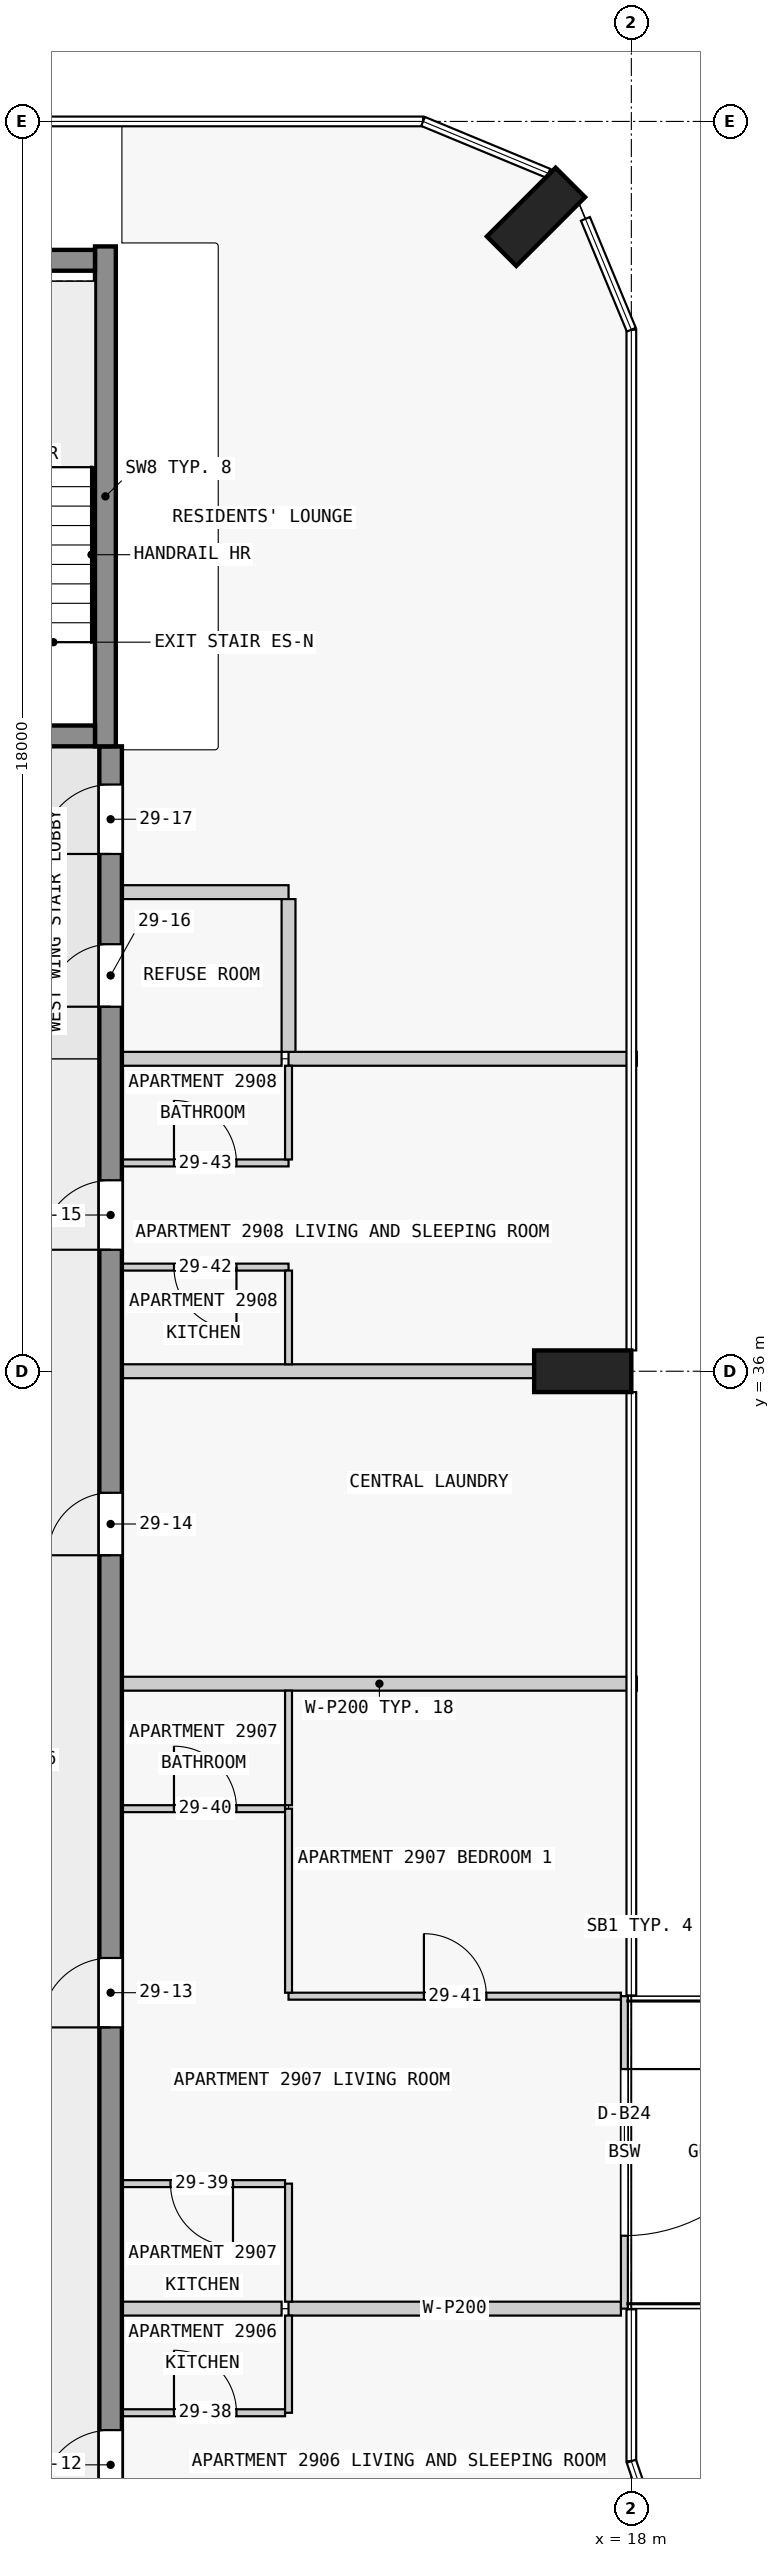
"""IFC4 building model, lengths in metres.
Left out: names, types, materials, properties, quantities, classifications, styles, units other than length and angle.
Written with IfcOpenShell. Run it as: python <this file> out.ifc"""

import sys

from ifc_helpers import new_model, si_unit, direction, frame, frame_2d, origin, origin_2d, place, context, subcontext, project, spatial, rectangle, extrude, element, fill, save


model = new_model("IFC4")
c1 = context("Model", 3, precision=1e-05, world=origin(), true_north=direction((0.0, 1.0)))
c2 = subcontext(c1, "Body", "Model", "MODEL_VIEW")
j1 = project(units=[si_unit("LENGTHUNIT", "METRE"), si_unit("PLANEANGLEUNIT", "RADIAN")], contexts=[c1])
p1 = place(None, origin())
s1 = spatial("IfcSite", under=j1, at=p1, CompositionType="ELEMENT")
p2 = place(p1, origin())
s2 = spatial("IfcBuilding", under=s1, at=p2, CompositionType="ELEMENT")
p3 = place(p2, frame((0.0, 0.0, 113.3)))
s3 = spatial("IfcBuildingStorey", under=s2, at=p3, CompositionType="ELEMENT", Elevation=113.3)
for number, where, z_axis, x_axis in (
    (1, (17.3, 36.0, 0.0), (0.0, 0.0, 1.0), (0.0, 1.0, 0.0)),
    (2, (16.626, 52.626, 0.0), (0.0, 0.0, 1.0), (-0.707, 0.707, 0.0)),
):
    element("IfcColumn", number, at=place(p3, frame(where, z_axis=z_axis, x_axis=x_axis)), inside=s3, PredefinedType="COLUMN", context=c2, shape_type="SweptSolid", body=[
        extrude(rectangle(XDim=0.6, YDim=1.4, at=origin_2d()), origin(), (0.0, 0.0, 1.0), 3.5),
    ])
p4 = place(p3, frame((7.725, 45.15, 0.0), z_axis=(0.0, 0.0, 1.0), x_axis=(1.0, 0.0, 0.0)))
e3 = element("IfcWall", 3, at=p4, inside=s3, PredefinedType="SHEAR", context=c2, shape_type="SweptSolid", body=[
    extrude(rectangle(XDim=2.55, YDim=0.3, at=frame_2d((1.275, 0.0))), origin(), (0.0, 0.0, 1.0), 3.5),
])
p5 = place(p4, frame((0.725, 0.0, 0.0)))
e4 = element("IfcOpeningElement", 4, at=p5, cuts=e3, PredefinedType="OPENING", context=c2, shape_type="SweptSolid", body=[
    extrude(rectangle(XDim=1.1, YDim=2.1, at=frame_2d((0.55, 1.05))), frame((0.0, 0.16, 0.0), z_axis=(0.0, -1.0, 0.0), x_axis=(1.0, 0.0, 0.0)), (0.0, 0.0, 1.0), 0.32),
])
p6 = place(p3, frame((7.725, 52.0, 0.0), z_axis=(0.0, 0.0, 1.0), x_axis=(1.0, 0.0, 0.0)))
e5 = element("IfcWall", 5, at=p6, inside=s3, PredefinedType="SHEAR", context=c2, shape_type="SweptSolid", body=[
    extrude(rectangle(XDim=2.55, YDim=0.3, at=frame_2d((1.275, 0.0))), origin(), (0.0, 0.0, 1.0), 3.5),
])
p7 = place(p3, frame((10.425, 45.0, 0.0), z_axis=(0.0, 0.0, 1.0), x_axis=(0.0, 1.0, 0.0)))
e6 = element("IfcWall", 6, at=p7, inside=s3, PredefinedType="SHEAR", context=c2, shape_type="SweptSolid", body=[
    extrude(rectangle(XDim=7.2, YDim=0.3, at=frame_2d((3.6, 0.0))), origin(), (0.0, 0.0, 1.0), 3.5),
])
p8 = place(p3, frame((10.5, 18.0, 0.0), z_axis=(0.0, 0.0, 1.0), x_axis=(0.0, 1.0, 0.0)))
e7 = element("IfcWall", 7, at=p8, inside=s3, PredefinedType="SHEAR", context=c2, shape_type="SweptSolid", body=[
    extrude(rectangle(XDim=27.0, YDim=0.325, at=frame_2d((13.5, 0.0))), origin(), (0.0, 0.0, 1.0), 3.25),
])
p9 = place(p8, frame((1.75, 0.0, 0.0)))
e8 = element("IfcOpeningElement", 8, at=p9, cuts=e7, PredefinedType="OPENING", context=c2, shape_type="SweptSolid", body=[
    extrude(rectangle(XDim=1.0, YDim=2.1, at=frame_2d((0.5, 1.05))), frame((0.0, 0.172, 0.0), z_axis=(0.0, -1.0, 0.0), x_axis=(1.0, 0.0, 0.0)), (0.0, 0.0, 1.0), 0.345),
])
p10 = place(p8, frame((8.55, 0.0, 0.0)))
e9 = element("IfcOpeningElement", 9, at=p10, cuts=e7, PredefinedType="OPENING", context=c2, shape_type="SweptSolid", body=[
    extrude(rectangle(XDim=1.0, YDim=2.1, at=frame_2d((0.5, 1.05))), frame((0.0, 0.172, 0.0), z_axis=(0.0, -1.0, 0.0), x_axis=(1.0, 0.0, 0.0)), (0.0, 0.0, 1.0), 0.345),
])
p11 = place(p8, frame((15.35, 0.0, 0.0)))
e10 = element("IfcOpeningElement", 10, at=p11, cuts=e7, PredefinedType="OPENING", context=c2, shape_type="SweptSolid", body=[
    extrude(rectangle(XDim=0.9, YDim=2.1, at=frame_2d((0.45, 1.05))), frame((0.0, 0.172, 0.0), z_axis=(0.0, -1.0, 0.0), x_axis=(1.0, 0.0, 0.0)), (0.0, 0.0, 1.0), 0.345),
])
p12 = place(p8, frame((19.75, 0.0, 0.0)))
e11 = element("IfcOpeningElement", 11, at=p12, cuts=e7, PredefinedType="OPENING", context=c2, shape_type="SweptSolid", body=[
    extrude(rectangle(XDim=1.0, YDim=2.1, at=frame_2d((0.5, 1.05))), frame((0.0, 0.172, 0.0), z_axis=(0.0, -1.0, 0.0), x_axis=(1.0, 0.0, 0.0)), (0.0, 0.0, 1.0), 0.345),
])
p13 = place(p8, frame((23.25, 0.0, 0.0)))
e12 = element("IfcOpeningElement", 12, at=p13, cuts=e7, PredefinedType="OPENING", context=c2, shape_type="SweptSolid", body=[
    extrude(rectangle(XDim=0.9, YDim=2.1, at=frame_2d((0.45, 1.05))), frame((0.0, 0.172, 0.0), z_axis=(0.0, -1.0, 0.0), x_axis=(1.0, 0.0, 0.0)), (0.0, 0.0, 1.0), 0.345),
])
p14 = place(p8, frame((25.45, 0.0, 0.0)))
e13 = element("IfcOpeningElement", 13, at=p14, cuts=e7, PredefinedType="OPENING", context=c2, shape_type="SweptSolid", body=[
    extrude(rectangle(XDim=1.0, YDim=2.1, at=frame_2d((0.5, 1.05))), frame((0.0, 0.172, 0.0), z_axis=(0.0, -1.0, 0.0), x_axis=(1.0, 0.0, 0.0)), (0.0, 0.0, 1.0), 0.345),
])
p15 = place(p3, frame((17.9, 27.0, 0.0), z_axis=(0.0, 0.0, 1.0), x_axis=(0.0, -1.0, 0.0)))
e14 = element("IfcWall", 14, at=p15, inside=s3, PredefinedType="STANDARD", context=c2, shape_type="SweptSolid", body=[
    extrude(rectangle(XDim=4.5, YDim=0.1, at=frame_2d((2.25, 0.0))), origin(), (0.0, 0.0, 1.0), 3.25),
])
p16 = place(p15, frame((1.05, 0.0, 0.0)))
e15 = element("IfcOpeningElement", 15, at=p16, cuts=e14, PredefinedType="OPENING", context=c2, shape_type="SweptSolid", body=[
    extrude(rectangle(XDim=2.4, YDim=2.4, at=frame_2d((1.2, 1.2))), frame((0.0, 0.06, 0.0), z_axis=(0.0, -1.0, 0.0), x_axis=(1.0, 0.0, 0.0)), (0.0, 0.0, 1.0), 0.12),
])
p17 = place(p3, frame((10.663, 21.0, 0.0), z_axis=(0.0, 0.0, 1.0), x_axis=(1.0, 0.0, 0.0)))
e16 = element("IfcWall", 16, at=p17, inside=s3, PredefinedType="PARTITIONING", context=c2, shape_type="SweptSolid", body=[
    extrude(rectangle(XDim=2.35, YDim=0.1, at=frame_2d((1.175, 0.0))), origin(), (0.0, 0.0, 1.0), 3.25),
])
p18 = place(p17, frame((0.75, 0.0, 0.0)))
e17 = element("IfcOpeningElement", 17, at=p18, cuts=e16, PredefinedType="OPENING", context=c2, shape_type="SweptSolid", body=[
    extrude(rectangle(XDim=0.9, YDim=2.1, at=frame_2d((0.45, 1.05))), frame((0.0, 0.06, 0.0), z_axis=(0.0, -1.0, 0.0), x_axis=(1.0, 0.0, 0.0)), (0.0, 0.0, 1.0), 0.12),
])
p19 = place(p3, frame((12.962, 22.5, 0.0), z_axis=(0.0, 0.0, 1.0), x_axis=(-1.0, 0.0, 0.0)))
e18 = element("IfcWall", 18, at=p19, inside=s3, PredefinedType="PARTITIONING", context=c2, shape_type="SweptSolid", body=[
    extrude(rectangle(XDim=2.3, YDim=0.2, at=frame_2d((1.15, 0.0))), origin(), (0.0, 0.0, 1.0), 3.25),
])
p20 = place(p3, frame((13.062, 22.5, 0.0), z_axis=(0.0, 0.0, 1.0), x_axis=(1.0, 0.0, 0.0)))
e19 = element("IfcWall", 19, at=p20, inside=s3, PredefinedType="PARTITIONING", context=c2, shape_type="SweptSolid", body=[
    extrude(rectangle(XDim=4.788, YDim=0.2, at=frame_2d((2.394, 0.0))), origin(), (0.0, 0.0, 1.0), 3.25),
])
p21 = place(p3, frame((13.012, 24.3, 0.0), z_axis=(0.0, 0.0, 1.0), x_axis=(-1.0, 0.0, 0.0)))
e20 = element("IfcWall", 20, at=p21, inside=s3, PredefinedType="PARTITIONING", context=c2, shape_type="SweptSolid", body=[
    extrude(rectangle(XDim=2.35, YDim=0.1, at=frame_2d((1.175, 0.0))), origin(), (0.0, 0.0, 1.0), 3.25),
])
p22 = place(p21, frame((0.75, 0.0, 0.0)))
e21 = element("IfcOpeningElement", 21, at=p22, cuts=e20, PredefinedType="OPENING", context=c2, shape_type="SweptSolid", body=[
    extrude(rectangle(XDim=0.9, YDim=2.1, at=frame_2d((0.45, 1.05))), frame((0.0, 0.06, 0.0), z_axis=(0.0, -1.0, 0.0), x_axis=(1.0, 0.0, 0.0)), (0.0, 0.0, 1.0), 0.12),
])
p23 = place(p3, frame((13.062, 27.0, 0.0), z_axis=(0.0, 0.0, 1.0), x_axis=(1.0, 0.0, 0.0)))
e22 = element("IfcWall", 22, at=p23, inside=s3, PredefinedType="PARTITIONING", context=c2, shape_type="SweptSolid", body=[
    extrude(rectangle(XDim=4.788, YDim=0.1, at=frame_2d((2.394, 0.0))), origin(), (0.0, 0.0, 1.0), 3.25),
])
p24 = place(p23, frame((1.95, 0.0, 0.0)))
e23 = element("IfcOpeningElement", 23, at=p24, cuts=e22, PredefinedType="OPENING", context=c2, shape_type="SweptSolid", body=[
    extrude(rectangle(XDim=0.9, YDim=2.1, at=frame_2d((0.45, 1.05))), frame((0.0, 0.06, 0.0), z_axis=(0.0, -1.0, 0.0), x_axis=(1.0, 0.0, 0.0)), (0.0, 0.0, 1.0), 0.12),
])
p25 = place(p3, frame((10.663, 29.7, 0.0), z_axis=(0.0, 0.0, 1.0), x_axis=(1.0, 0.0, 0.0)))
e24 = element("IfcWall", 24, at=p25, inside=s3, PredefinedType="PARTITIONING", context=c2, shape_type="SweptSolid", body=[
    extrude(rectangle(XDim=2.35, YDim=0.1, at=frame_2d((1.175, 0.0))), origin(), (0.0, 0.0, 1.0), 3.25),
])
p26 = place(p25, frame((0.75, 0.0, 0.0)))
e25 = element("IfcOpeningElement", 25, at=p26, cuts=e24, PredefinedType="OPENING", context=c2, shape_type="SweptSolid", body=[
    extrude(rectangle(XDim=0.9, YDim=2.1, at=frame_2d((0.45, 1.05))), frame((0.0, 0.06, 0.0), z_axis=(0.0, -1.0, 0.0), x_axis=(1.0, 0.0, 0.0)), (0.0, 0.0, 1.0), 0.12),
])
p27 = place(p3, frame((18.08, 31.5, 0.0), z_axis=(0.0, 0.0, 1.0), x_axis=(-1.0, 0.0, 0.0)))
e26 = element("IfcWall", 26, at=p27, inside=s3, PredefinedType="PARTITIONING", context=c2, shape_type="SweptSolid", body=[
    extrude(rectangle(XDim=7.417, YDim=0.2, at=frame_2d((3.709, 0.0))), origin(), (0.0, 0.0, 1.0), 3.25),
])
p28 = place(p3, frame((16.6, 36.0, 0.0), z_axis=(0.0, 0.0, 1.0), x_axis=(-1.0, 0.0, 0.0)))
e27 = element("IfcWall", 27, at=p28, inside=s3, PredefinedType="PARTITIONING", context=c2, shape_type="SweptSolid", body=[
    extrude(rectangle(XDim=5.938, YDim=0.2, at=frame_2d((2.969, 0.0))), origin(), (0.0, 0.0, 1.0), 3.25),
])
p29 = place(p3, frame((13.062, 37.5, 0.0), z_axis=(0.0, 0.0, 1.0), x_axis=(-1.0, 0.0, 0.0)))
e28 = element("IfcWall", 28, at=p29, inside=s3, PredefinedType="PARTITIONING", context=c2, shape_type="SweptSolid", body=[
    extrude(rectangle(XDim=2.4, YDim=0.1, at=frame_2d((1.2, 0.0))), origin(), (0.0, 0.0, 1.0), 3.25),
])
p30 = place(p29, frame((0.75, 0.0, 0.0)))
e29 = element("IfcOpeningElement", 29, at=p30, cuts=e28, PredefinedType="OPENING", context=c2, shape_type="SweptSolid", body=[
    extrude(rectangle(XDim=0.9, YDim=2.1, at=frame_2d((0.45, 1.05))), frame((0.0, 0.06, 0.0), z_axis=(0.0, -1.0, 0.0), x_axis=(1.0, 0.0, 0.0)), (0.0, 0.0, 1.0), 0.12),
])
p31 = place(p3, frame((10.663, 39.0, 0.0), z_axis=(0.0, 0.0, 1.0), x_axis=(1.0, 0.0, 0.0)))
e30 = element("IfcWall", 30, at=p31, inside=s3, PredefinedType="PARTITIONING", context=c2, shape_type="SweptSolid", body=[
    extrude(rectangle(XDim=2.4, YDim=0.1, at=frame_2d((1.2, 0.0))), origin(), (0.0, 0.0, 1.0), 3.25),
])
p32 = place(p31, frame((0.75, 0.0, 0.0)))
e31 = element("IfcOpeningElement", 31, at=p32, cuts=e30, PredefinedType="OPENING", context=c2, shape_type="SweptSolid", body=[
    extrude(rectangle(XDim=0.9, YDim=2.1, at=frame_2d((0.45, 1.05))), frame((0.0, 0.06, 0.0), z_axis=(0.0, -1.0, 0.0), x_axis=(1.0, 0.0, 0.0)), (0.0, 0.0, 1.0), 0.12),
])
p33 = place(p3, frame((12.962, 40.5, 0.0), z_axis=(0.0, 0.0, 1.0), x_axis=(-1.0, 0.0, 0.0)))
e32 = element("IfcWall", 32, at=p33, inside=s3, PredefinedType="PARTITIONING", context=c2, shape_type="SweptSolid", body=[
    extrude(rectangle(XDim=2.3, YDim=0.2, at=frame_2d((1.15, 0.0))), origin(), (0.0, 0.0, 1.0), 3.25),
])
p34 = place(p3, frame((13.062, 40.5, 0.0), z_axis=(0.0, 0.0, 1.0), x_axis=(1.0, 0.0, 0.0)))
e33 = element("IfcWall", 33, at=p34, inside=s3, PredefinedType="PARTITIONING", context=c2, shape_type="SweptSolid", body=[
    extrude(rectangle(XDim=5.018, YDim=0.2, at=frame_2d((2.509, 0.0))), origin(), (0.0, 0.0, 1.0), 3.25),
])
p35 = place(p3, frame((13.062, 42.9, 0.0), z_axis=(0.0, 0.0, 1.0), x_axis=(-1.0, 0.0, 0.0)))
e34 = element("IfcWall", 34, at=p35, inside=s3, PredefinedType="PARTITIONING", context=c2, shape_type="SweptSolid", body=[
    extrude(rectangle(XDim=2.4, YDim=0.2, at=frame_2d((1.2, 0.0))), origin(), (0.0, 0.0, 1.0), 3.25),
])
p36 = place(p3, frame((13.062, 29.7, 0.0), z_axis=(0.0, 0.0, 1.0), x_axis=(0.0, -1.0, 0.0)))
e35 = element("IfcWall", 35, at=p36, inside=s3, PredefinedType="PARTITIONING", context=c2, shape_type="SweptSolid", body=[
    extrude(rectangle(XDim=2.65, YDim=0.1, at=frame_2d((1.325, 0.0))), origin(), (0.0, 0.0, 1.0), 3.25),
])
p37 = place(p3, frame((13.062, 21.0, 0.0), z_axis=(0.0, 0.0, 1.0), x_axis=(0.0, 1.0, 0.0)))
e36 = element("IfcWall", 36, at=p37, inside=s3, PredefinedType="PARTITIONING", context=c2, shape_type="SweptSolid", body=[
    extrude(rectangle(XDim=1.4, YDim=0.1, at=frame_2d((0.7, 0.0))), origin(), (0.0, 0.0, 1.0), 3.25),
])
p38 = place(p3, frame((13.062, 22.6, 0.0), z_axis=(0.0, 0.0, 1.0), x_axis=(0.0, 1.0, 0.0)))
e37 = element("IfcWall", 37, at=p38, inside=s3, PredefinedType="PARTITIONING", context=c2, shape_type="SweptSolid", body=[
    extrude(rectangle(XDim=1.7, YDim=0.1, at=frame_2d((0.85, 0.0))), origin(), (0.0, 0.0, 1.0), 3.25),
])
p39 = place(p3, frame((13.062, 29.75, 0.0), z_axis=(0.0, 0.0, 1.0), x_axis=(0.0, 1.0, 0.0)))
e38 = element("IfcWall", 38, at=p39, inside=s3, PredefinedType="PARTITIONING", context=c2, shape_type="SweptSolid", body=[
    extrude(rectangle(XDim=1.65, YDim=0.1, at=frame_2d((0.825, 0.0))), origin(), (0.0, 0.0, 1.0), 3.25),
])
for number, where, z_axis, x_axis in (
    (39, (13.062, 36.1, 0.0), (0.0, 0.0, 1.0), (0.0, 1.0, 0.0)),
    (40, (13.062, 39.05, 0.0), (0.0, 0.0, 1.0), (0.0, 1.0, 0.0)),
):
    element("IfcWall", number, at=place(p3, frame(where, z_axis=z_axis, x_axis=x_axis)), inside=s3, PredefinedType="PARTITIONING", context=c2, shape_type="SweptSolid", body=[
        extrude(rectangle(XDim=1.35, YDim=0.1, at=frame_2d((0.675, 0.0))), origin(), (0.0, 0.0, 1.0), 3.25),
    ])
p40 = place(p3, frame((13.062, 40.6, 0.0), z_axis=(0.0, 0.0, 1.0), x_axis=(0.0, 1.0, 0.0)))
e41 = element("IfcWall", 41, at=p40, inside=s3, PredefinedType="PARTITIONING", context=c2, shape_type="SweptSolid", body=[
    extrude(rectangle(XDim=2.2, YDim=0.2, at=frame_2d((1.1, 0.0))), origin(), (0.0, 0.0, 1.0), 3.25),
])
p41 = place(p16, origin())
e42 = element("IfcDoor", 42, at=p41, inside=s3, OperationType="SINGLE_SWING_LEFT", PredefinedType="DOOR", context=c2, shape_type="SweptSolid", body=[
    extrude(rectangle(XDim=2.4, YDim=2.4, at=frame_2d((1.2, 1.2))), frame((0.0, 0.025, 0.0), z_axis=(0.0, -1.0, 0.0), x_axis=(1.0, 0.0, 0.0)), (0.0, 0.0, 1.0), 0.05),
])
fill(e15, e42)
p42 = place(p9, origin())
e43 = element("IfcDoor", 43, at=p42, inside=s3, OperationType="SINGLE_SWING_LEFT", PredefinedType="DOOR", context=c2, shape_type="SweptSolid", body=[
    extrude(rectangle(XDim=1.0, YDim=2.1, at=frame_2d((0.5, 1.05))), frame((0.0, 0.025, 0.0), z_axis=(0.0, -1.0, 0.0), x_axis=(1.0, 0.0, 0.0)), (0.0, 0.0, 1.0), 0.05),
])
fill(e8, e43)
p43 = place(p10, origin())
e44 = element("IfcDoor", 44, at=p43, inside=s3, OperationType="SINGLE_SWING_LEFT", PredefinedType="DOOR", context=c2, shape_type="SweptSolid", body=[
    extrude(rectangle(XDim=1.0, YDim=2.1, at=frame_2d((0.5, 1.05))), frame((0.0, 0.025, 0.0), z_axis=(0.0, -1.0, 0.0), x_axis=(1.0, 0.0, 0.0)), (0.0, 0.0, 1.0), 0.05),
])
fill(e9, e44)
p44 = place(p11, origin())
e45 = element("IfcDoor", 45, at=p44, inside=s3, OperationType="SINGLE_SWING_RIGHT", PredefinedType="DOOR", context=c2, shape_type="SweptSolid", body=[
    extrude(rectangle(XDim=0.9, YDim=2.1, at=frame_2d((0.45, 1.05))), frame((0.0, 0.025, 0.0), z_axis=(0.0, -1.0, 0.0), x_axis=(1.0, 0.0, 0.0)), (0.0, 0.0, 1.0), 0.05),
])
fill(e10, e45)
p45 = place(p12, origin())
e46 = element("IfcDoor", 46, at=p45, inside=s3, OperationType="SINGLE_SWING_RIGHT", PredefinedType="DOOR", context=c2, shape_type="SweptSolid", body=[
    extrude(rectangle(XDim=1.0, YDim=2.1, at=frame_2d((0.5, 1.05))), frame((0.0, 0.025, 0.0), z_axis=(0.0, -1.0, 0.0), x_axis=(1.0, 0.0, 0.0)), (0.0, 0.0, 1.0), 0.05),
])
fill(e11, e46)
p46 = place(p13, origin())
e47 = element("IfcDoor", 47, at=p46, inside=s3, OperationType="SINGLE_SWING_RIGHT", PredefinedType="DOOR", context=c2, shape_type="SweptSolid", body=[
    extrude(rectangle(XDim=0.9, YDim=2.1, at=frame_2d((0.45, 1.05))), frame((0.0, 0.025, 0.0), z_axis=(0.0, -1.0, 0.0), x_axis=(1.0, 0.0, 0.0)), (0.0, 0.0, 1.0), 0.05),
])
fill(e12, e47)
p47 = place(p14, origin())
e48 = element("IfcDoor", 48, at=p47, inside=s3, OperationType="SINGLE_SWING_RIGHT", PredefinedType="DOOR", context=c2, shape_type="SweptSolid", body=[
    extrude(rectangle(XDim=1.0, YDim=2.1, at=frame_2d((0.5, 1.05))), frame((0.0, 0.025, 0.0), z_axis=(0.0, -1.0, 0.0), x_axis=(1.0, 0.0, 0.0)), (0.0, 0.0, 1.0), 0.05),
])
fill(e13, e48)
p48 = place(p18, origin())
e49 = element("IfcDoor", 49, at=p48, inside=s3, OperationType="SINGLE_SWING_RIGHT", PredefinedType="DOOR", context=c2, shape_type="SweptSolid", body=[
    extrude(rectangle(XDim=0.9, YDim=2.1, at=frame_2d((0.45, 1.05))), frame((0.0, 0.025, 0.0), z_axis=(0.0, -1.0, 0.0), x_axis=(1.0, 0.0, 0.0)), (0.0, 0.0, 1.0), 0.05),
])
fill(e17, e49)
p49 = place(p22, origin())
e50 = element("IfcDoor", 50, at=p49, inside=s3, OperationType="SINGLE_SWING_RIGHT", PredefinedType="DOOR", context=c2, shape_type="SweptSolid", body=[
    extrude(rectangle(XDim=0.9, YDim=2.1, at=frame_2d((0.45, 1.05))), frame((0.0, 0.025, 0.0), z_axis=(0.0, -1.0, 0.0), x_axis=(1.0, 0.0, 0.0)), (0.0, 0.0, 1.0), 0.05),
])
fill(e21, e50)
p50 = place(p26, origin())
e51 = element("IfcDoor", 51, at=p50, inside=s3, OperationType="SINGLE_SWING_RIGHT", PredefinedType="DOOR", context=c2, shape_type="SweptSolid", body=[
    extrude(rectangle(XDim=0.9, YDim=2.1, at=frame_2d((0.45, 1.05))), frame((0.0, 0.025, 0.0), z_axis=(0.0, -1.0, 0.0), x_axis=(1.0, 0.0, 0.0)), (0.0, 0.0, 1.0), 0.05),
])
fill(e25, e51)
p51 = place(p24, origin())
e52 = element("IfcDoor", 52, at=p51, inside=s3, OperationType="SINGLE_SWING_RIGHT", PredefinedType="DOOR", context=c2, shape_type="SweptSolid", body=[
    extrude(rectangle(XDim=0.9, YDim=2.1, at=frame_2d((0.45, 1.05))), frame((0.0, 0.025, 0.0), z_axis=(0.0, -1.0, 0.0), x_axis=(1.0, 0.0, 0.0)), (0.0, 0.0, 1.0), 0.05),
])
fill(e23, e52)
p52 = place(p30, origin())
e53 = element("IfcDoor", 53, at=p52, inside=s3, OperationType="SINGLE_SWING_LEFT", PredefinedType="DOOR", context=c2, shape_type="SweptSolid", body=[
    extrude(rectangle(XDim=0.9, YDim=2.1, at=frame_2d((0.45, 1.05))), frame((0.0, 0.025, 0.0), z_axis=(0.0, -1.0, 0.0), x_axis=(1.0, 0.0, 0.0)), (0.0, 0.0, 1.0), 0.05),
])
fill(e29, e53)
p53 = place(p32, origin())
e54 = element("IfcDoor", 54, at=p53, inside=s3, OperationType="SINGLE_SWING_LEFT", PredefinedType="DOOR", context=c2, shape_type="SweptSolid", body=[
    extrude(rectangle(XDim=0.9, YDim=2.1, at=frame_2d((0.45, 1.05))), frame((0.0, 0.025, 0.0), z_axis=(0.0, -1.0, 0.0), x_axis=(1.0, 0.0, 0.0)), (0.0, 0.0, 1.0), 0.05),
])
fill(e31, e54)
save(model, sys.argv[1])
